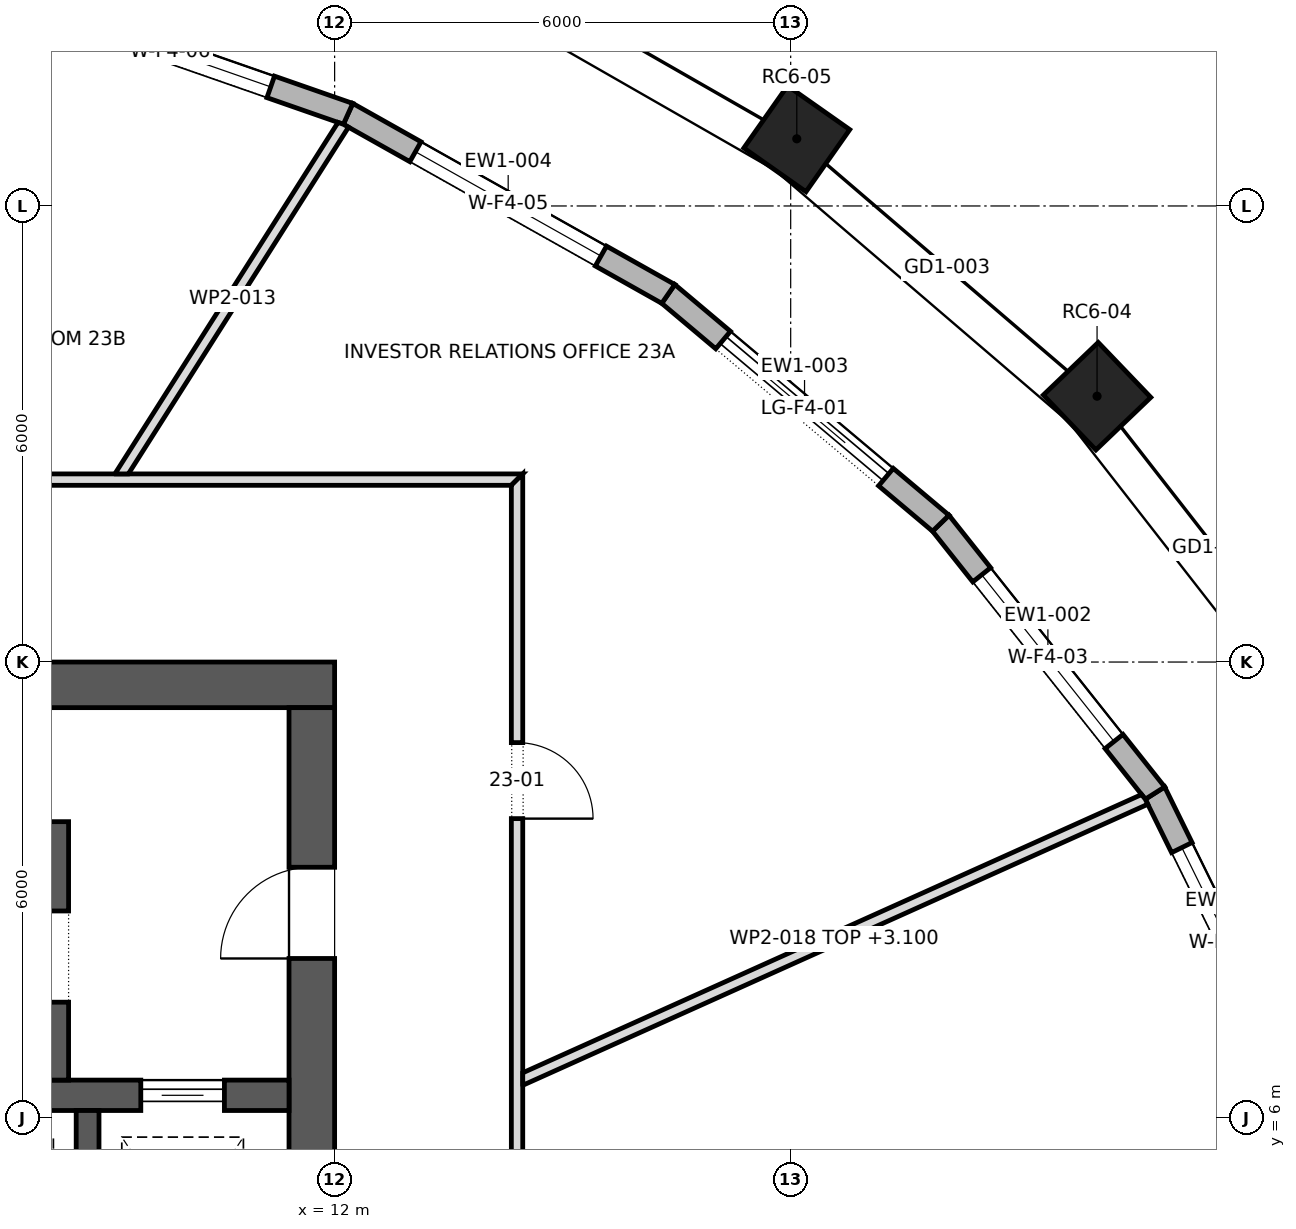
"""IFC4 building model, lengths in metres.
Left out: names, types, materials, properties, quantities, classifications, styles, units other than length and angle.
Written with IfcOpenShell. Run it as: python <this file> out.ifc"""

import sys

from ifc_helpers import new_model, si_unit, direction, frame, frame_2d, origin, origin_2d, place, context, subcontext, project, spatial, polyline, rectangle, outline, extrude, element, fill, save


model = new_model("IFC4")
c1 = context("Model", 3, precision=1e-05, world=origin(), true_north=direction((0.0, 1.0)))
c2 = subcontext(c1, "Body", "Model", "MODEL_VIEW")
j1 = project(units=[si_unit("LENGTHUNIT", "METRE"), si_unit("PLANEANGLEUNIT", "RADIAN")], contexts=[c1])
p1 = place(None, origin())
s1 = spatial("IfcSite", under=j1, at=p1, CompositionType="ELEMENT")
p2 = place(p1, origin())
s2 = spatial("IfcBuilding", under=s1, at=p2, CompositionType="ELEMENT")
p3 = place(p2, frame((0.0, 0.0, 316.3)))
s3 = spatial("IfcBuildingStorey", under=s2, at=p3, CompositionType="ELEMENT", Elevation=316.3)
for number, where, z_axis, x_axis in (
    (1, (22.031, 15.497, 0.0), (0.0, 0.0, 1.0), (-0.692, 0.722, 0.0)),
    (2, (18.08, 18.884, 0.0), (0.0, 0.0, 1.0), (-0.818, 0.575, 0.0)),
):
    element("IfcColumn", number, at=place(p3, frame(where, z_axis=z_axis, x_axis=x_axis)), inside=s3, PredefinedType="COLUMN", context=c2, shape_type="SweptSolid", body=[
        extrude(rectangle(XDim=1.0, YDim=1.0, at=origin_2d()), origin(), (0.0, 0.0, 1.0), 4.0),
    ])
p4 = place(p3, frame((-12.0, 11.7, 0.0), z_axis=(0.0, 0.0, 1.0), x_axis=(1.0, 0.0, 0.0)))
e3 = element("IfcWall", 3, at=p4, inside=s3, PredefinedType="SHEAR", context=c2, shape_type="SweptSolid", body=[
    extrude(rectangle(XDim=24.0, YDim=0.6, at=frame_2d((12.0, 0.0))), origin(), (0.0, 0.0, 1.0), 4.0),
])
p5 = place(p4, frame((9.975, 0.0, 0.0)))
e4 = element("IfcOpeningElement", 4, at=p5, cuts=e3, PredefinedType="OPENING", context=c2, shape_type="SweptSolid", body=[
    extrude(rectangle(XDim=0.9, YDim=2.1, at=frame_2d((0.45, 1.05))), frame((0.0, 0.312, 0.0), z_axis=(0.0, -1.0, 0.0), x_axis=(1.0, 0.0, 0.0)), (0.0, 0.0, 1.0), 0.624),
])
p6 = place(p4, frame((3.6, 0.0, 0.0)))
e5 = element("IfcOpeningElement", 5, at=p6, cuts=e3, PredefinedType="OPENING", context=c2, shape_type="SweptSolid", body=[
    extrude(rectangle(XDim=0.8, YDim=2.1, at=frame_2d((0.4, 1.05))), frame((0.0, 0.312, 0.0), z_axis=(0.0, -1.0, 0.0), x_axis=(1.0, 0.0, 0.0)), (0.0, 0.0, 1.0), 0.624),
])
p7 = place(p4, frame((6.2, 0.0, 0.0)))
e6 = element("IfcOpeningElement", 6, at=p7, cuts=e3, PredefinedType="OPENING", context=c2, shape_type="SweptSolid", body=[
    extrude(rectangle(XDim=0.8, YDim=2.1, at=frame_2d((0.4, 1.05))), frame((0.0, 0.312, 0.0), z_axis=(0.0, -1.0, 0.0), x_axis=(1.0, 0.0, 0.0)), (0.0, 0.0, 1.0), 0.624),
])
p8 = place(p4, frame((15.85, 0.0, 0.0)))
e7 = element("IfcOpeningElement", 7, at=p8, cuts=e3, PredefinedType="OPENING", context=c2, shape_type="SweptSolid", body=[
    extrude(rectangle(XDim=0.8, YDim=2.1, at=frame_2d((0.4, 1.05))), frame((0.0, 0.312, 0.0), z_axis=(0.0, -1.0, 0.0), x_axis=(1.0, 0.0, 0.0)), (0.0, 0.0, 1.0), 0.624),
])
p9 = place(p3, frame((11.7, -11.4, 0.0), z_axis=(0.0, 0.0, 1.0), x_axis=(0.0, 1.0, 0.0)))
e8 = element("IfcWall", 8, at=p9, inside=s3, PredefinedType="SHEAR", context=c2, shape_type="SweptSolid", body=[
    extrude(rectangle(XDim=22.8, YDim=0.6, at=frame_2d((11.4, 0.0))), origin(), (0.0, 0.0, 1.0), 4.0),
])
p10 = place(p9, frame((10.2, 0.0, 0.0)))
e9 = element("IfcOpeningElement", 9, at=p10, cuts=e8, PredefinedType="OPENING", context=c2, shape_type="SweptSolid", body=[
    extrude(rectangle(XDim=2.4, YDim=2.1, at=frame_2d((1.2, 1.05))), frame((0.0, 0.312, 0.0), z_axis=(0.0, -1.0, 0.0), x_axis=(1.0, 0.0, 0.0)), (0.0, 0.0, 1.0), 0.624),
])
p11 = place(p9, frame((19.5, 0.0, 0.0)))
e10 = element("IfcOpeningElement", 10, at=p11, cuts=e8, PredefinedType="OPENING", context=c2, shape_type="SweptSolid", body=[
    extrude(rectangle(XDim=1.2, YDim=2.1, at=frame_2d((0.6, 1.05))), frame((0.0, 0.312, 0.0), z_axis=(0.0, -1.0, 0.0), x_axis=(1.0, 0.0, 0.0)), (0.0, 0.0, 1.0), 0.624),
])
p12 = place(p9, frame((2.1, 0.0, 0.0)))
e11 = element("IfcOpeningElement", 11, at=p12, cuts=e8, PredefinedType="OPENING", context=c2, shape_type="SweptSolid", body=[
    extrude(rectangle(XDim=1.2, YDim=2.1, at=frame_2d((0.6, 1.05))), frame((0.0, 0.312, 0.0), z_axis=(0.0, -1.0, 0.0), x_axis=(1.0, 0.0, 0.0)), (0.0, 0.0, 1.0), 0.624),
])
p13 = place(p3, frame((-11.4, 6.3, 0.0), z_axis=(0.0, 0.0, 1.0), x_axis=(1.0, 0.0, 0.0)))
e12 = element("IfcWall", 12, at=p13, inside=s3, PredefinedType="SHEAR", context=c2, shape_type="SweptSolid", body=[
    extrude(rectangle(XDim=22.8, YDim=0.4, at=frame_2d((11.4, 0.0))), origin(), (0.0, 0.0, 1.0), 4.0),
])
p14 = place(p13, frame((20.85, 0.0, 0.0)))
e13 = element("IfcOpeningElement", 13, at=p14, cuts=e12, PredefinedType="OPENING", context=c2, shape_type="SweptSolid", body=[
    extrude(rectangle(XDim=1.1, YDim=2.1, at=frame_2d((0.55, 1.05))), frame((0.0, 0.212, 0.0), z_axis=(0.0, -1.0, 0.0), x_axis=(1.0, 0.0, 0.0)), (0.0, 0.0, 1.0), 0.424),
])
p15 = place(p3, frame((8.75, 3.2, 0.0), z_axis=(0.0, 0.0, 1.0), x_axis=(0.0, 1.0, 0.0)))
e14 = element("IfcWall", 14, at=p15, inside=s3, PredefinedType="SHEAR", context=c2, shape_type="SweptSolid", body=[
    extrude(rectangle(XDim=2.9, YDim=0.3, at=frame_2d((1.45, 0.0))), origin(), (0.0, 0.0, 1.0), 4.0),
])
p16 = place(p3, frame((24.736, 6.33, 0.0), z_axis=(0.0, 0.0, 1.0), x_axis=(-0.441610485853, 0.897206876247, 0.0)))
e15 = element("IfcWall", 15, at=p16, inside=s3, PredefinedType="STANDARD", context=c2, shape_type="SweptSolid", body=[
    extrude(outline(polyline([(-0.017, -0.15), (4.415, -0.15), (4.383, 0.15), (0.017, 0.15), (-0.017, -0.15)])), origin(), (0.0, 0.0, 1.0), 3.7),
])
p17 = place(p16, frame((0.8, 0.0, 0.6)))
e16 = element("IfcOpeningElement", 16, at=p17, cuts=e15, PredefinedType="OPENING", context=c2, shape_type="SweptSolid", body=[
    extrude(rectangle(XDim=2.8, YDim=2.65, at=frame_2d((1.4, 1.325))), frame((0.0, 0.162, 0.0), z_axis=(0.0, -1.0, 0.0), x_axis=(1.0, 0.0, 0.0)), (0.0, 0.0, 1.0), 0.324),
])
p18 = place(p3, frame((22.793, 10.276, 0.0), z_axis=(0.0, 0.0, 1.0), x_axis=(-0.621800530555, 0.783175650925, 0.0)))
e17 = element("IfcWall", 17, at=p18, inside=s3, PredefinedType="STANDARD", context=c2, shape_type="SweptSolid", body=[
    extrude(outline(polyline([(-0.016, -0.15), (4.548, -0.15), (4.517, 0.15), (0.016, 0.15), (-0.016, -0.15)])), origin(), (0.0, 0.0, 1.0), 3.7),
])
p19 = place(p18, frame((0.866, 0.0, 0.6)))
e18 = element("IfcOpeningElement", 18, at=p19, cuts=e17, PredefinedType="OPENING", context=c2, shape_type="SweptSolid", body=[
    extrude(rectangle(XDim=2.8, YDim=2.65, at=frame_2d((1.4, 1.325))), frame((0.0, 0.162, 0.0), z_axis=(0.0, -1.0, 0.0), x_axis=(1.0, 0.0, 0.0)), (0.0, 0.0, 1.0), 0.324),
])
p20 = place(p3, frame((19.975, 13.826, 0.0), z_axis=(0.0, 0.0, 1.0), x_axis=(-0.765128700347, 0.643877373344, 0.0)))
e19 = element("IfcWall", 19, at=p20, inside=s3, PredefinedType="STANDARD", context=c2, shape_type="SweptSolid", body=[
    extrude(outline(polyline([(-0.015, -0.15), (4.7, -0.15), (4.671, 0.15), (0.015, 0.15), (-0.015, -0.15)])), origin(), (0.0, 0.0, 1.0), 3.7),
])
p21 = place(p20, frame((0.943, 0.0, 0.0)))
e20 = element("IfcOpeningElement", 20, at=p21, cuts=e19, PredefinedType="OPENING", context=c2, shape_type="SweptSolid", body=[
    extrude(rectangle(XDim=2.8, YDim=3.25, at=frame_2d((1.4, 1.625))), frame((0.0, 0.162, 0.0), z_axis=(0.0, -1.0, 0.0), x_axis=(1.0, 0.0, 0.0)), (0.0, 0.0, 1.0), 0.324),
])
p22 = place(p3, frame((16.39, 16.843, 0.0), z_axis=(0.0, 0.0, 1.0), x_axis=(-0.871651071333, 0.49012693238, 0.0)))
e21 = element("IfcWall", 21, at=p22, inside=s3, PredefinedType="STANDARD", context=c2, shape_type="SweptSolid", body=[
    extrude(outline(polyline([(-0.014, -0.15), (4.846, -0.15), (4.82, 0.15), (0.014, 0.15), (-0.014, -0.15)])), origin(), (0.0, 0.0, 1.0), 3.7),
])
p23 = place(p22, frame((1.017, 0.0, 0.6)))
e22 = element("IfcOpeningElement", 22, at=p23, cuts=e21, PredefinedType="OPENING", context=c2, shape_type="SweptSolid", body=[
    extrude(rectangle(XDim=2.8, YDim=2.65, at=frame_2d((1.4, 1.325))), frame((0.0, 0.162, 0.0), z_axis=(0.0, -1.0, 0.0), x_axis=(1.0, 0.0, 0.0)), (0.0, 0.0, 1.0), 0.324),
])
p24 = place(p3, frame((12.177, 19.212, 0.0), z_axis=(0.0, 0.0, 1.0), x_axis=(-0.944273917508, 0.329160703479, 0.0)))
e23 = element("IfcWall", 23, at=p24, inside=s3, PredefinedType="STANDARD", context=c2, shape_type="SweptSolid", body=[
    extrude(outline(polyline([(-0.013, -0.15), (4.968, -0.15), (4.943, 0.15), (0.013, 0.15), (-0.013, -0.15)])), origin(), (0.0, 0.0, 1.0), 3.7),
])
p25 = place(p24, frame((1.078, 0.0, 0.6)))
e24 = element("IfcOpeningElement", 24, at=p25, cuts=e23, PredefinedType="OPENING", context=c2, shape_type="SweptSolid", body=[
    extrude(rectangle(XDim=2.8, YDim=2.65, at=frame_2d((1.4, 1.325))), frame((0.0, 0.162, 0.0), z_axis=(0.0, -1.0, 0.0), x_axis=(1.0, 0.0, 0.0)), (0.0, 0.0, 1.0), 0.324),
])
p26 = place(p3, frame((8.375, 6.5, 0.0), z_axis=(0.0, 0.0, 1.0), x_axis=(0.0, 1.0, 0.0)))
e25 = element("IfcWall", 25, at=p26, inside=s3, PredefinedType="SHEAR", context=c2, shape_type="SweptSolid", body=[
    extrude(rectangle(XDim=3.4, YDim=0.25, at=frame_2d((1.7, 0.0))), origin(), (0.0, 0.0, 1.0), 3.7),
])
p27 = place(p26, frame((1.025, 0.0, 0.0)))
e26 = element("IfcOpeningElement", 26, at=p27, cuts=e25, PredefinedType="OPENING", context=c2, shape_type="SweptSolid", body=[
    extrude(rectangle(XDim=1.2, YDim=2.1, at=frame_2d((0.6, 1.05))), frame((0.0, 0.137, 0.0), z_axis=(0.0, -1.0, 0.0), x_axis=(1.0, 0.0, 0.0)), (0.0, 0.0, 1.0), 0.274),
])
p28 = place(p3, frame((-14.475, 14.4, 0.0), z_axis=(0.0, 0.0, 1.0), x_axis=(1.0, 0.0, 0.0)))
e27 = element("IfcWall", 27, at=p28, inside=s3, PredefinedType="PARTITIONING", context=c2, shape_type="SweptSolid", body=[
    extrude(outline(polyline([(0.15, -0.075), (2.06, -0.075), (3.97, -0.075), (5.88, -0.075), (7.79, -0.075), (9.7, -0.075), (11.61, -0.075), (13.52, -0.075), (15.43, -0.075), (17.34, -0.075), (19.25, -0.075), (21.16, -0.075), (23.07, -0.075), (24.98, -0.075), (26.89, -0.075), (28.8, -0.075), (28.95, 0.075), (27.02, 0.075), (25.09, 0.075), (23.16, 0.075), (21.23, 0.075), (19.3, 0.075), (17.37, 0.075), (15.44, 0.075), (13.51, 0.075), (11.58, 0.075), (9.65, 0.075), (7.72, 0.075), (5.79, 0.075), (3.86, 0.075), (1.93, 0.075), (0.0, 0.075), (0.15, -0.075)])), origin(), (0.0, 0.0, 1.0), 3.7),
])
p29 = place(p28, frame((17.705, 0.0, 0.0)))
e28 = element("IfcOpeningElement", 28, at=p29, cuts=e27, PredefinedType="OPENING", context=c2, shape_type="SweptSolid", body=[
    extrude(rectangle(XDim=1.0, YDim=2.1, at=frame_2d((0.5, 1.05))), frame((0.0, 0.087, 0.0), z_axis=(0.0, -1.0, 0.0), x_axis=(1.0, 0.0, 0.0)), (0.0, 0.0, 1.0), 0.174),
])
p30 = place(p28, frame((8.555, 0.0, 0.0)))
e29 = element("IfcOpeningElement", 29, at=p30, cuts=e27, PredefinedType="OPENING", context=c2, shape_type="SweptSolid", body=[
    extrude(rectangle(XDim=1.0, YDim=2.1, at=frame_2d((0.5, 1.05))), frame((0.0, 0.087, 0.0), z_axis=(0.0, -1.0, 0.0), x_axis=(1.0, 0.0, 0.0)), (0.0, 0.0, 1.0), 0.174),
])
p31 = place(p3, frame((9.172, 14.435, 0.0), z_axis=(0.0, 0.0, 1.0), x_axis=(0.536016173419, 0.844207712493, 0.0)))
e30 = element("IfcWall", 30, at=p31, inside=s3, PredefinedType="PARTITIONING", context=c2, shape_type="SweptSolid", body=[
    extrude(outline(polyline([(0.095, -0.075), (1.896, -0.075), (3.697, -0.075), (5.498, -0.075), (5.494, 0.003), (5.477, 0.075), (3.651, 0.075), (1.826, 0.075), (0.0, 0.075), (0.0, 0.074), (0.095, -0.075)])), origin(), (0.0, 0.0, 1.0), 3.7),
])
p32 = place(p3, frame((14.4, -14.475, 0.0), z_axis=(0.0, 0.0, 1.0), x_axis=(0.0, 1.0, 0.0)))
e31 = element("IfcWall", 31, at=p32, inside=s3, PredefinedType="PARTITIONING", context=c2, shape_type="SweptSolid", body=[
    extrude(outline(polyline([(0.0, -0.075), (1.93, -0.075), (3.86, -0.075), (5.79, -0.075), (7.72, -0.075), (9.65, -0.075), (11.58, -0.075), (13.51, -0.075), (15.44, -0.075), (17.37, -0.075), (19.3, -0.075), (21.23, -0.075), (23.16, -0.075), (25.09, -0.075), (27.02, -0.075), (28.95, -0.075), (28.8, 0.075), (26.89, 0.075), (24.98, 0.075), (23.07, 0.075), (21.16, 0.075), (19.25, 0.075), (17.34, 0.075), (15.43, 0.075), (13.52, 0.075), (11.61, 0.075), (9.7, 0.075), (7.79, 0.075), (5.88, 0.075), (3.97, 0.075), (2.06, 0.075), (0.15, 0.075), (0.0, -0.075)])), origin(), (0.0, 0.0, 1.0), 3.7),
])
p33 = place(p32, frame((24.415, 0.0, 0.0)))
e32 = element("IfcOpeningElement", 32, at=p33, cuts=e31, PredefinedType="OPENING", context=c2, shape_type="SweptSolid", body=[
    extrude(rectangle(XDim=1.0, YDim=2.1, at=frame_2d((0.5, 1.05))), frame((0.0, 0.087, 0.0), z_axis=(0.0, -1.0, 0.0), x_axis=(1.0, 0.0, 0.0)), (0.0, 0.0, 1.0), 0.174),
])
p34 = place(p32, frame((3.535, 0.0, 0.0)))
e33 = element("IfcOpeningElement", 33, at=p34, cuts=e31, PredefinedType="OPENING", context=c2, shape_type="SweptSolid", body=[
    extrude(rectangle(XDim=1.0, YDim=2.1, at=frame_2d((0.5, 1.05))), frame((0.0, 0.087, 0.0), z_axis=(0.0, -1.0, 0.0), x_axis=(1.0, 0.0, 0.0)), (0.0, 0.0, 1.0), 0.174),
])
p35 = place(p32, frame((10.14, 0.0, 0.0)))
e34 = element("IfcOpeningElement", 34, at=p35, cuts=e31, PredefinedType="OPENING", context=c2, shape_type="SweptSolid", body=[
    extrude(rectangle(XDim=1.0, YDim=2.1, at=frame_2d((0.5, 1.05))), frame((0.0, 0.087, 0.0), z_axis=(0.0, -1.0, 0.0), x_axis=(1.0, 0.0, 0.0)), (0.0, 0.0, 1.0), 0.174),
])
p36 = place(p32, frame((16.62, 0.0, 0.0)))
e35 = element("IfcOpeningElement", 35, at=p36, cuts=e31, PredefinedType="OPENING", context=c2, shape_type="SweptSolid", body=[
    extrude(rectangle(XDim=1.0, YDim=2.1, at=frame_2d((0.5, 1.05))), frame((0.0, 0.087, 0.0), z_axis=(0.0, -1.0, 0.0), x_axis=(1.0, 0.0, 0.0)), (0.0, 0.0, 1.0), 0.174),
])
p37 = place(p3, frame((22.667, 10.197, 0.0), z_axis=(0.0, 0.0, 1.0), x_axis=(-0.912043070278, -0.410094425662, 0.0)))
e36 = element("IfcWall", 36, at=p37, inside=s3, PredefinedType="PARTITIONING", context=c2, shape_type="SweptSolid", body=[
    extrude(outline(polyline([(0.021, -0.075), (1.807, -0.075), (3.592, -0.075), (5.378, -0.075), (7.163, -0.075), (8.948, -0.075), (9.016, 0.074), (9.016, 0.075), (7.212, 0.075), (5.409, 0.075), (3.606, 0.075), (1.803, 0.075), (0.0, 0.075), (0.0, 0.066), (0.002, 0.001), (0.021, -0.075)])), origin(), (0.0, 0.0, 1.0), 3.1),
])
p38 = place(p17, origin())
e37 = element("IfcWindow", 37, at=p38, inside=s3, PartitioningType="DOUBLE_PANEL_VERTICAL", PredefinedType="WINDOW", context=c2, shape_type="SweptSolid", body=[
    extrude(rectangle(XDim=2.8, YDim=2.65, at=frame_2d((1.4, 1.325))), frame((0.0, 0.03, 0.0), z_axis=(0.0, -1.0, 0.0), x_axis=(1.0, 0.0, 0.0)), (0.0, 0.0, 1.0), 0.06),
])
fill(e16, e37)
p39 = place(p19, origin())
e38 = element("IfcWindow", 38, at=p39, inside=s3, PartitioningType="DOUBLE_PANEL_VERTICAL", PredefinedType="WINDOW", context=c2, shape_type="SweptSolid", body=[
    extrude(rectangle(XDim=2.8, YDim=2.65, at=frame_2d((1.4, 1.325))), frame((0.0, 0.03, 0.0), z_axis=(0.0, -1.0, 0.0), x_axis=(1.0, 0.0, 0.0)), (0.0, 0.0, 1.0), 0.06),
])
fill(e18, e38)
p40 = place(p21, origin())
e39 = element("IfcDoor", 39, at=p40, inside=s3, OperationType="DOUBLE_DOOR_SLIDING", PredefinedType="DOOR", context=c2, shape_type="SweptSolid", body=[
    extrude(rectangle(XDim=2.8, YDim=3.25, at=frame_2d((1.4, 1.625))), frame((0.0, 0.025, 0.0), z_axis=(0.0, -1.0, 0.0), x_axis=(1.0, 0.0, 0.0)), (0.0, 0.0, 1.0), 0.05),
])
fill(e20, e39)
p41 = place(p23, origin())
e40 = element("IfcWindow", 40, at=p41, inside=s3, PartitioningType="DOUBLE_PANEL_VERTICAL", PredefinedType="WINDOW", context=c2, shape_type="SweptSolid", body=[
    extrude(rectangle(XDim=2.8, YDim=2.65, at=frame_2d((1.4, 1.325))), frame((0.0, 0.03, 0.0), z_axis=(0.0, -1.0, 0.0), x_axis=(1.0, 0.0, 0.0)), (0.0, 0.0, 1.0), 0.06),
])
fill(e22, e40)
p42 = place(p25, origin())
e41 = element("IfcWindow", 41, at=p42, inside=s3, PartitioningType="DOUBLE_PANEL_VERTICAL", PredefinedType="WINDOW", context=c2, shape_type="SweptSolid", body=[
    extrude(rectangle(XDim=2.8, YDim=2.65, at=frame_2d((1.4, 1.325))), frame((0.0, 0.03, 0.0), z_axis=(0.0, -1.0, 0.0), x_axis=(1.0, 0.0, 0.0)), (0.0, 0.0, 1.0), 0.06),
])
fill(e24, e41)
p43 = place(p14, origin())
e42 = element("IfcDoor", 42, at=p43, inside=s3, OperationType="SLIDING_TO_LEFT", PredefinedType="DOOR", context=c2, shape_type="SweptSolid", body=[
    extrude(rectangle(XDim=1.1, YDim=2.1, at=frame_2d((0.55, 1.05))), frame((0.0, 0.025, 0.0), z_axis=(0.0, -1.0, 0.0), x_axis=(1.0, 0.0, 0.0)), (0.0, 0.0, 1.0), 0.05),
])
fill(e13, e42)
p44 = place(p27, origin())
e43 = element("IfcDoor", 43, at=p44, inside=s3, OperationType="SINGLE_SWING_RIGHT", PredefinedType="DOOR", context=c2, shape_type="SweptSolid", body=[
    extrude(rectangle(XDim=1.2, YDim=2.1, at=frame_2d((0.6, 1.05))), frame((0.0, 0.025, 0.0), z_axis=(0.0, -1.0, 0.0), x_axis=(1.0, 0.0, 0.0)), (0.0, 0.0, 1.0), 0.05),
])
fill(e26, e43)
p45 = place(p11, origin())
e44 = element("IfcDoor", 44, at=p45, inside=s3, OperationType="SINGLE_SWING_RIGHT", PredefinedType="DOOR", context=c2, shape_type="SweptSolid", body=[
    extrude(rectangle(XDim=1.2, YDim=2.1, at=frame_2d((0.6, 1.05))), frame((0.0, 0.025, 0.0), z_axis=(0.0, -1.0, 0.0), x_axis=(1.0, 0.0, 0.0)), (0.0, 0.0, 1.0), 0.05),
])
fill(e10, e44)
p46 = place(p33, frame((1.0, 0.0, 0.0), z_axis=(0.0, 0.0, 1.0), x_axis=(-1.0, 0.0, 0.0)))
e45 = element("IfcDoor", 45, at=p46, inside=s3, OperationType="SINGLE_SWING_LEFT", PredefinedType="DOOR", context=c2, shape_type="SweptSolid", body=[
    extrude(rectangle(XDim=1.0, YDim=2.1, at=frame_2d((0.5, 1.05))), frame((0.0, 0.025, 0.0), z_axis=(0.0, -1.0, 0.0), x_axis=(1.0, 0.0, 0.0)), (0.0, 0.0, 1.0), 0.05),
])
fill(e32, e45)
save(model, sys.argv[1])
